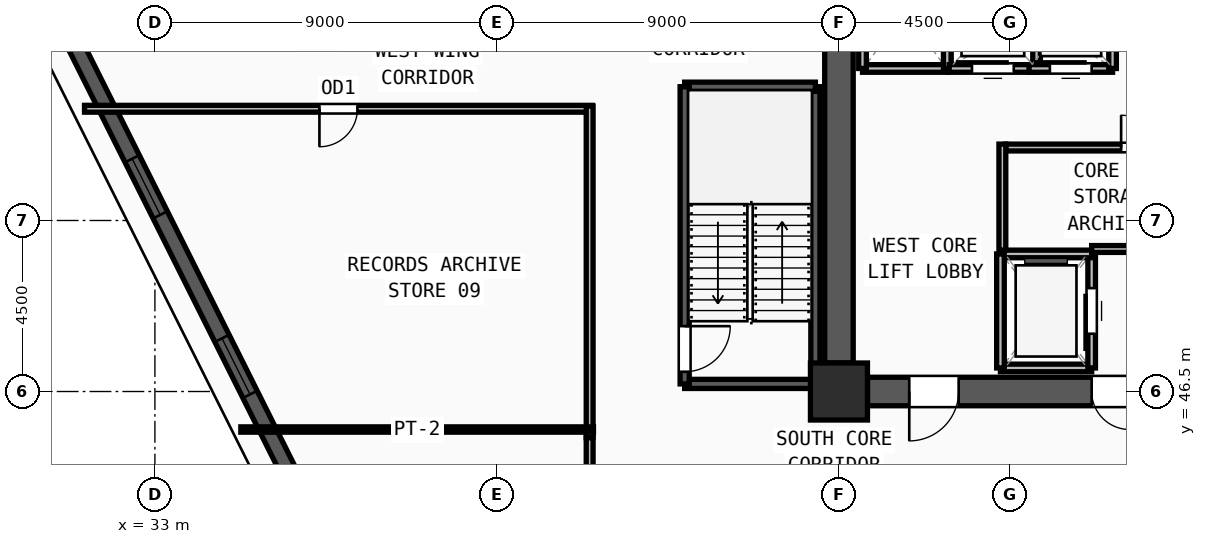
"""IFC4 building model, lengths in metres.
Left out: names, types, materials, properties, quantities, classifications, styles, units other than length and angle.
Written with IfcOpenShell. Run it as: python <this file> out.ifc"""

import sys

from ifc_helpers import new_model, si_unit, direction, frame, frame_2d, origin, origin_2d, place, context, subcontext, project, spatial, rectangle, extrude, source, transform, mapped, element, fill, save


model = new_model("IFC4")
c1 = context("Model", 3, precision=1e-05, world=origin(), true_north=direction((0.0, 1.0)))
c2 = subcontext(c1, "Body", "Model", "MODEL_VIEW")
j1 = project(units=[si_unit("LENGTHUNIT", "METRE"), si_unit("PLANEANGLEUNIT", "RADIAN")], contexts=[c1])
p1 = place(None, origin())
s1 = spatial("IfcSite", under=j1, at=p1, CompositionType="ELEMENT")
p2 = place(p1, origin())
s2 = spatial("IfcBuilding", under=s1, at=p2, CompositionType="ELEMENT")
p3 = place(p2, frame((0.0, 0.0, 155.25)))
s3 = spatial("IfcBuildingStorey", under=s2, at=p3, CompositionType="ELEMENT", Elevation=155.25)
m1 = source(origin(), c2, "Body", "SweptSolid", [
    extrude(rectangle(XDim=1.5, YDim=1.5, at=origin_2d()), origin(), (0.0, 0.0, 1.0), 3.75),
])
p4 = place(p3, frame((51.0, 46.5, 0.0), z_axis=(0.0, 0.0, 1.0), x_axis=(1.0, 0.0, 0.0)))
e1 = element("IfcColumn", 1, at=p4, inside=s3, PredefinedType="COLUMN", context=c2, shape_type="MappedRepresentation", body=[
    mapped(m1, transform((0.0, 0.0, 0.0), x_axis=(1.0, 0.0, 0.0), y_axis=(0.0, 1.0, 0.0), z_axis=(0.0, 0.0, 1.0), scale=1.0)),
])
p5 = place(p3, frame((25.204, 67.014, 0.0), z_axis=(0.0, 0.0, 1.0), x_axis=(0.447340705753, -0.894363624583, 0.0)))
e2 = element("IfcWall", 2, at=p5, inside=s3, PredefinedType="SOLIDWALL", context=c2, shape_type="SweptSolid", body=[
    extrude(rectangle(XDim=30.73, YDim=0.42, at=frame_2d((15.365, 0.0))), origin(), (0.0, 0.0, 1.0), 3.57),
])
m2 = source(origin(), c2, "Body", "SweptSolid", [
    extrude(rectangle(XDim=1.65, YDim=1.95, at=frame_2d((0.825, 0.975))), frame((0.0, 0.22, 0.0), z_axis=(0.0, -1.0, 0.0), x_axis=(1.0, 0.0, 0.0)), (0.0, 0.0, 1.0), 0.44),
])
p6 = place(p5, frame((7.708, 0.0, 0.55)))
e3 = element("IfcOpeningElement", 3, at=p6, cuts=e2, PredefinedType="OPENING", context=c2, shape_type="MappedRepresentation", body=[
    mapped(m2, transform((0.0, 0.0, 0.0), x_axis=(1.0, 0.0, 0.0), y_axis=(0.0, 1.0, 0.0), z_axis=(0.0, 0.0, 1.0), scale=1.0)),
])
p7 = place(p5, frame((16.09, 0.0, 0.55)))
e4 = element("IfcOpeningElement", 4, at=p7, cuts=e2, PredefinedType="OPENING", context=c2, shape_type="MappedRepresentation", body=[
    mapped(m2, transform((0.0, 0.0, 0.0), x_axis=(1.0, 0.0, 0.0), y_axis=(0.0, 1.0, 0.0), z_axis=(0.0, 0.0, 1.0), scale=1.0)),
])
p8 = place(p5, frame((21.373, 0.0, 0.55)))
e5 = element("IfcOpeningElement", 5, at=p8, cuts=e2, PredefinedType="OPENING", context=c2, shape_type="MappedRepresentation", body=[
    mapped(m2, transform((0.0, 0.0, 0.0), x_axis=(1.0, 0.0, 0.0), y_axis=(0.0, 1.0, 0.0), z_axis=(0.0, 0.0, 1.0), scale=1.0)),
])
p9 = place(p3, frame((59.25, 46.5, 0.0), z_axis=(0.0, 0.0, 1.0), x_axis=(-1.0, 0.0, 0.0)))
e6 = element("IfcWall", 6, at=p9, inside=s3, PredefinedType="SHEAR", context=c2, shape_type="SweptSolid", body=[
    extrude(rectangle(XDim=7.5, YDim=0.75, at=frame_2d((3.75, 0.0))), origin(), (0.0, 0.0, 1.0), 3.57),
])
m3 = source(origin(), c2, "Body", "SweptSolid", [
    extrude(rectangle(XDim=1.3, YDim=2.2, at=frame_2d((0.65, 1.1))), frame((0.0, 0.385, 0.0), z_axis=(0.0, -1.0, 0.0), x_axis=(1.0, 0.0, 0.0)), (0.0, 0.0, 1.0), 0.77),
])
p10 = place(p9, frame((5.1, 0.0, 0.0)))
e7 = element("IfcOpeningElement", 7, at=p10, cuts=e6, PredefinedType="OPENING", context=c2, shape_type="MappedRepresentation", body=[
    mapped(m3, transform((0.0, 0.0, 0.0), x_axis=(1.0, 0.0, 0.0), y_axis=(0.0, 1.0, 0.0), z_axis=(0.0, 0.0, 1.0), scale=1.0)),
])
m4 = source(origin(), c2, "Body", "SweptSolid", [
    extrude(rectangle(XDim=1.0, YDim=2.2, at=frame_2d((0.5, 1.1))), frame((0.0, 0.385, 0.0), z_axis=(0.0, -1.0, 0.0), x_axis=(1.0, 0.0, 0.0)), (0.0, 0.0, 1.0), 0.77),
])
p11 = place(p9, frame((0.6, 0.0, 0.0)))
e8 = element("IfcOpeningElement", 8, at=p11, cuts=e6, PredefinedType="OPENING", context=c2, shape_type="MappedRepresentation", body=[
    mapped(m4, transform((0.0, 0.0, 0.0), x_axis=(1.0, 0.0, 0.0), y_axis=(0.0, 1.0, 0.0), z_axis=(0.0, 0.0, 1.0), scale=1.0)),
])
p12 = place(p3, frame((51.0, 47.25, 0.0), z_axis=(0.0, 0.0, 1.0), x_axis=(0.0, 1.0, 0.0)))
e9 = element("IfcWall", 9, at=p12, inside=s3, PredefinedType="SHEAR", context=c2, shape_type="SweptSolid", body=[
    extrude(rectangle(XDim=13.5, YDim=0.75, at=frame_2d((6.75, 0.0))), origin(), (0.0, 0.0, 1.0), 3.57),
])
p13 = place(p3, frame((46.94, 46.7, 0.0), z_axis=(0.0, 0.0, 1.0), x_axis=(1.0, 0.0, 0.0)))
e10 = element("IfcWall", 10, at=p13, inside=s3, PredefinedType="SOLIDWALL", context=c2, shape_type="SweptSolid", body=[
    extrude(rectangle(XDim=3.44, YDim=0.24, at=frame_2d((1.72, 0.0))), origin(), (0.0, 0.0, 1.0), 3.57),
])
p14 = place(p3, frame((50.38, 46.7, 0.0), z_axis=(0.0, 0.0, 1.0), x_axis=(0.0, 1.0, 0.0)))
e11 = element("IfcWall", 11, at=p14, inside=s3, PredefinedType="SOLIDWALL", context=c2, shape_type="SweptSolid", body=[
    extrude(rectangle(XDim=7.82, YDim=0.24, at=frame_2d((3.91, 0.0))), origin(), (0.0, 0.0, 1.0), 3.57),
])
p15 = place(p3, frame((50.38, 54.52, 0.0), z_axis=(0.0, 0.0, 1.0), x_axis=(-1.0, 0.0, 0.0)))
e12 = element("IfcWall", 12, at=p15, inside=s3, PredefinedType="SOLIDWALL", context=c2, shape_type="SweptSolid", body=[
    extrude(rectangle(XDim=3.44, YDim=0.24, at=frame_2d((1.72, 0.0))), origin(), (0.0, 0.0, 1.0), 3.57),
])
p16 = place(p3, frame((46.94, 54.52, 0.0), z_axis=(0.0, 0.0, 1.0), x_axis=(0.0, -1.0, 0.0)))
e13 = element("IfcWall", 13, at=p16, inside=s3, PredefinedType="SOLIDWALL", context=c2, shape_type="SweptSolid", body=[
    extrude(rectangle(XDim=7.82, YDim=0.24, at=frame_2d((3.91, 0.0))), origin(), (0.0, 0.0, 1.0), 3.57),
])
m5 = source(origin(), c2, "Body", "SweptSolid", [
    extrude(rectangle(XDim=1.2, YDim=2.2, at=frame_2d((0.6, 1.1))), frame((0.0, 0.13, 0.0), z_axis=(0.0, -1.0, 0.0), x_axis=(1.0, 0.0, 0.0)), (0.0, 0.0, 1.0), 0.26),
])
p17 = place(p16, frame((6.3, 0.0, 0.0)))
e14 = element("IfcOpeningElement", 14, at=p17, cuts=e13, PredefinedType="OPENING", context=c2, shape_type="MappedRepresentation", body=[
    mapped(m5, transform((0.0, 0.0, 0.0), x_axis=(1.0, 0.0, 0.0), y_axis=(0.0, 1.0, 0.0), z_axis=(0.0, 0.0, 1.0), scale=1.0)),
])
p18 = place(p3, frame((55.25, 47.12, 0.0), z_axis=(0.0, 0.0, 1.0), x_axis=(1.0, 0.0, 0.0)))
e15 = element("IfcWall", 15, at=p18, inside=s3, PredefinedType="SOLIDWALL", context=c2, shape_type="SweptSolid", body=[
    extrude(rectangle(XDim=2.4, YDim=0.2, at=frame_2d((1.2, 0.0))), origin(), (0.0, 0.0, 1.0), 3.57),
])
p19 = place(p3, frame((57.65, 47.12, 0.0), z_axis=(0.0, 0.0, 1.0), x_axis=(0.0, 1.0, 0.0)))
e16 = element("IfcWall", 16, at=p19, inside=s3, PredefinedType="SOLIDWALL", context=c2, shape_type="SweptSolid", body=[
    extrude(rectangle(XDim=3.0, YDim=0.2, at=frame_2d((1.5, 0.0))), origin(), (0.0, 0.0, 1.0), 3.57),
])
m6 = source(origin(), c2, "Body", "SweptSolid", [
    extrude(rectangle(XDim=1.2, YDim=2.3, at=frame_2d((0.6, 1.15))), frame((0.0, 0.11, 0.0), z_axis=(0.0, -1.0, 0.0), x_axis=(1.0, 0.0, 0.0)), (0.0, 0.0, 1.0), 0.22),
])
p20 = place(p19, frame((0.9, 0.0, 0.0)))
e17 = element("IfcOpeningElement", 17, at=p20, cuts=e16, PredefinedType="OPENING", context=c2, shape_type="MappedRepresentation", body=[
    mapped(m6, transform((0.0, 0.0, 0.0), x_axis=(1.0, 0.0, 0.0), y_axis=(0.0, 1.0, 0.0), z_axis=(0.0, 0.0, 1.0), scale=1.0)),
])
p21 = place(p3, frame((57.65, 50.12, 0.0), z_axis=(0.0, 0.0, 1.0), x_axis=(-1.0, 0.0, 0.0)))
e18 = element("IfcWall", 18, at=p21, inside=s3, PredefinedType="SOLIDWALL", context=c2, shape_type="SweptSolid", body=[
    extrude(rectangle(XDim=2.4, YDim=0.2, at=frame_2d((1.2, 0.0))), origin(), (0.0, 0.0, 1.0), 3.57),
])
p22 = place(p3, frame((55.25, 50.12, 0.0), z_axis=(0.0, 0.0, 1.0), x_axis=(0.0, -1.0, 0.0)))
e19 = element("IfcWall", 19, at=p22, inside=s3, PredefinedType="SOLIDWALL", context=c2, shape_type="SweptSolid", body=[
    extrude(rectangle(XDim=3.0, YDim=0.2, at=frame_2d((1.5, 0.0))), origin(), (0.0, 0.0, 1.0), 3.57),
])
p23 = place(p3, frame((51.62, 55.0, 0.0), z_axis=(0.0, 0.0, 1.0), x_axis=(1.0, 0.0, 0.0)))
e20 = element("IfcWall", 20, at=p23, inside=s3, PredefinedType="SOLIDWALL", context=c2, shape_type="SweptSolid", body=[
    extrude(rectangle(XDim=2.23, YDim=0.2, at=frame_2d((1.115, 0.0))), origin(), (0.0, 0.0, 1.0), 3.57),
])
for number, where, z_axis, x_axis in (
    (21, (53.85, 55.0, 0.0), (0.0, 0.0, 1.0), (0.0, 1.0, 0.0)),
    (22, (51.62, 58.0, 0.0), (0.0, 0.0, 1.0), (0.0, -1.0, 0.0)),
):
    element("IfcWall", number, at=place(p3, frame(where, z_axis=z_axis, x_axis=x_axis)), inside=s3, PredefinedType="SOLIDWALL", context=c2, shape_type="SweptSolid", body=[
        extrude(rectangle(XDim=3.0, YDim=0.2, at=frame_2d((1.5, 0.0))), origin(), (0.0, 0.0, 1.0), 3.57),
    ])
p24 = place(p3, frame((53.9, 55.0, 0.0), z_axis=(0.0, 0.0, 1.0), x_axis=(1.0, 0.0, 0.0)))
e23 = element("IfcWall", 23, at=p24, inside=s3, PredefinedType="SOLIDWALL", context=c2, shape_type="SweptSolid", body=[
    extrude(rectangle(XDim=2.3, YDim=0.2, at=frame_2d((1.15, 0.0))), origin(), (0.0, 0.0, 1.0), 3.57),
])
m7 = source(origin(), c2, "Body", "SweptSolid", [
    extrude(rectangle(XDim=1.1, YDim=2.2, at=frame_2d((0.55, 1.1))), frame((0.0, 0.11, 0.0), z_axis=(0.0, -1.0, 0.0), x_axis=(1.0, 0.0, 0.0)), (0.0, 0.0, 1.0), 0.22),
])
p25 = place(p24, frame((0.6, 0.0, 0.0)))
e24 = element("IfcOpeningElement", 24, at=p25, cuts=e23, PredefinedType="OPENING", context=c2, shape_type="MappedRepresentation", body=[
    mapped(m7, transform((0.0, 0.0, 0.0), x_axis=(1.0, 0.0, 0.0), y_axis=(0.0, 1.0, 0.0), z_axis=(0.0, 0.0, 1.0), scale=1.0)),
])
p26 = place(p3, frame((56.2, 55.0, 0.0), z_axis=(0.0, 0.0, 1.0), x_axis=(0.0, 1.0, 0.0)))
e25 = element("IfcWall", 25, at=p26, inside=s3, PredefinedType="SOLIDWALL", context=c2, shape_type="SweptSolid", body=[
    extrude(rectangle(XDim=2.6, YDim=0.2, at=frame_2d((1.3, 0.0))), origin(), (0.0, 0.0, 1.0), 3.57),
])
p27 = place(p3, frame((56.0, 55.0, 0.0), z_axis=(0.0, 0.0, 1.0), x_axis=(1.0, 0.0, 0.0)))
e26 = element("IfcWall", 26, at=p27, inside=s3, PredefinedType="SOLIDWALL", context=c2, shape_type="SweptSolid", body=[
    extrude(rectangle(XDim=2.2, YDim=0.2, at=frame_2d((1.1, 0.0))), origin(), (0.0, 0.0, 1.0), 3.57),
])
p28 = place(p27, frame((0.55, 0.0, 0.0)))
e27 = element("IfcOpeningElement", 27, at=p28, cuts=e26, PredefinedType="OPENING", context=c2, shape_type="MappedRepresentation", body=[
    mapped(m7, transform((0.0, 0.0, 0.0), x_axis=(1.0, 0.0, 0.0), y_axis=(0.0, 1.0, 0.0), z_axis=(0.0, 0.0, 1.0), scale=1.0)),
])
p29 = place(p3, frame((58.2, 55.0, 0.0), z_axis=(0.0, 0.0, 1.0), x_axis=(0.0, 1.0, 0.0)))
e28 = element("IfcWall", 28, at=p29, inside=s3, PredefinedType="SOLIDWALL", context=c2, shape_type="SweptSolid", body=[
    extrude(rectangle(XDim=2.6, YDim=0.2, at=frame_2d((1.3, 0.0))), origin(), (0.0, 0.0, 1.0), 3.57),
])
p30 = place(p3, frame((55.39, 52.92, 0.0), z_axis=(0.0, 0.0, 1.0), x_axis=(1.0, 0.0, 0.0)))
e29 = element("IfcWall", 29, at=p30, inside=s3, PredefinedType="PARTITIONING", context=c2, shape_type="SweptSolid", body=[
    extrude(rectangle(XDim=6.91, YDim=0.18, at=frame_2d((3.455, 0.0))), origin(), (0.0, 0.0, 1.0), 3.57),
])
m8 = source(origin(), c2, "Body", "SweptSolid", [
    extrude(rectangle(XDim=0.85, YDim=2.1, at=frame_2d((0.425, 1.05))), frame((0.0, 0.1, 0.0), z_axis=(0.0, -1.0, 0.0), x_axis=(1.0, 0.0, 0.0)), (0.0, 0.0, 1.0), 0.2),
])
p31 = place(p30, frame((3.035, 0.0, 0.0)))
e30 = element("IfcOpeningElement", 30, at=p31, cuts=e29, PredefinedType="OPENING", context=c2, shape_type="MappedRepresentation", body=[
    mapped(m8, transform((0.0, 0.0, 0.0), x_axis=(1.0, 0.0, 0.0), y_axis=(0.0, 1.0, 0.0), z_axis=(0.0, 0.0, 1.0), scale=1.0)),
])
p32 = place(p3, frame((44.51, 53.94, 0.0), z_axis=(0.0, 0.0, 1.0), x_axis=(-1.0, 0.0, 0.0)))
e31 = element("IfcWall", 31, at=p32, inside=s3, PredefinedType="PARTITIONING", context=c2, shape_type="SweptSolid", body=[
    extrude(rectangle(XDim=13.362, YDim=0.18, at=frame_2d((6.681, 0.0))), origin(), (0.0, 0.0, 1.0), 3.57),
])
m9 = source(origin(), c2, "Body", "SweptSolid", [
    extrude(rectangle(XDim=1.0, YDim=2.2, at=frame_2d((0.5, 1.1))), frame((0.0, 0.1, 0.0), z_axis=(0.0, -1.0, 0.0), x_axis=(1.0, 0.0, 0.0)), (0.0, 0.0, 1.0), 0.2),
])
p33 = place(p32, frame((6.181, 0.0, 0.0)))
e32 = element("IfcOpeningElement", 32, at=p33, cuts=e31, PredefinedType="OPENING", context=c2, shape_type="MappedRepresentation", body=[
    mapped(m9, transform((0.0, 0.0, 0.0), x_axis=(1.0, 0.0, 0.0), y_axis=(0.0, 1.0, 0.0), z_axis=(0.0, 0.0, 1.0), scale=1.0)),
])
p34 = place(p3, frame((44.44, 45.285, 0.0), z_axis=(0.0, 0.0, 1.0), x_axis=(0.0, 1.0, 0.0)))
e33 = element("IfcWall", 33, at=p34, inside=s3, PredefinedType="PARTITIONING", context=c2, shape_type="SweptSolid", body=[
    extrude(rectangle(XDim=8.725, YDim=0.18, at=frame_2d((4.363, 0.0))), origin(), (0.0, 0.0, 1.0), 3.57),
])
p35 = place(p3, frame((44.44, 43.67, 0.0), z_axis=(0.0, 0.0, 1.0), x_axis=(0.0, 1.0, 0.0)))
e34 = element("IfcWall", 34, at=p35, inside=s3, PredefinedType="PARTITIONING", context=c2, shape_type="SweptSolid", body=[
    extrude(rectangle(XDim=1.615, YDim=0.18, at=frame_2d((0.808, 0.0))), origin(), (0.0, 0.0, 1.0), 3.57),
])
p36 = place(p3, frame((44.54, 45.5, 0.0), z_axis=(0.0, 0.0, 1.0), x_axis=(-1.0, 0.0, 0.0)))
e35 = element("IfcWall", 35, at=p36, inside=s3, PredefinedType="PARTITIONING", context=c2, shape_type="SweptSolid", body=[
    extrude(rectangle(XDim=9.279, YDim=0.14, at=frame_2d((4.64, 0.0))), origin(), (0.0, 0.0, 1.0), 3.57),
])
p37 = place(p3, frame((55.3, 50.22, 0.0), z_axis=(0.0, 0.0, 1.0), x_axis=(0.0, 1.0, 0.0)))
e36 = element("IfcWall", 36, at=p37, inside=s3, PredefinedType="PARTITIONING", context=c2, shape_type="SweptSolid", body=[
    extrude(rectangle(XDim=2.79, YDim=0.18, at=frame_2d((1.395, 0.0))), origin(), (0.0, 0.0, 1.0), 3.57),
])
p38 = place(p3, frame((57.65, 50.25, 0.0), z_axis=(0.0, 0.0, 1.0), x_axis=(1.0, 0.0, 0.0)))
e37 = element("IfcWall", 37, at=p38, inside=s3, PredefinedType="PARTITIONING", context=c2, shape_type="SweptSolid", body=[
    extrude(rectangle(XDim=4.65, YDim=0.18, at=frame_2d((2.325, 0.0))), origin(), (0.0, 0.0, 1.0), 3.57),
])
m10 = source(origin(), c2, "Body", "SweptSolid", [
    extrude(rectangle(XDim=1.65, YDim=1.95, at=frame_2d((0.825, 0.975))), frame((0.0, 0.03, 0.0), z_axis=(0.0, -1.0, 0.0), x_axis=(1.0, 0.0, 0.0)), (0.0, 0.0, 1.0), 0.06),
])
p39 = place(p7, origin())
e38 = element("IfcWindow", 38, at=p39, inside=s3, PartitioningType="DOUBLE_PANEL_VERTICAL", PredefinedType="WINDOW", context=c2, shape_type="MappedRepresentation", body=[
    mapped(m10, transform((0.0, 0.0, 0.0), x_axis=(1.0, 0.0, 0.0), y_axis=(0.0, 1.0, 0.0), z_axis=(0.0, 0.0, 1.0), scale=1.0)),
])
fill(e4, e38)
p40 = place(p8, origin())
e39 = element("IfcWindow", 39, at=p40, inside=s3, PartitioningType="DOUBLE_PANEL_VERTICAL", PredefinedType="WINDOW", context=c2, shape_type="MappedRepresentation", body=[
    mapped(m10, transform((0.0, 0.0, 0.0), x_axis=(1.0, 0.0, 0.0), y_axis=(0.0, 1.0, 0.0), z_axis=(0.0, 0.0, 1.0), scale=1.0)),
])
fill(e5, e39)
m11 = source(origin(), c2, "Body", "SweptSolid", [
    extrude(rectangle(XDim=1.3, YDim=2.2, at=frame_2d((0.65, 1.1))), frame((0.0, 0.025, 0.0), z_axis=(0.0, -1.0, 0.0), x_axis=(1.0, 0.0, 0.0)), (0.0, 0.0, 1.0), 0.05),
])
p41 = place(p10, origin())
e40 = element("IfcDoor", 40, at=p41, inside=s3, OperationType="SINGLE_SWING_RIGHT", PredefinedType="DOOR", context=c2, shape_type="MappedRepresentation", body=[
    mapped(m11, transform((0.0, 0.0, 0.0), x_axis=(1.0, 0.0, 0.0), y_axis=(0.0, 1.0, 0.0), z_axis=(0.0, 0.0, 1.0), scale=1.0)),
])
fill(e7, e40)
m12 = source(origin(), c2, "Body", "SweptSolid", [
    extrude(rectangle(XDim=1.0, YDim=2.2, at=frame_2d((0.5, 1.1))), frame((0.0, 0.025, 0.0), z_axis=(0.0, -1.0, 0.0), x_axis=(1.0, 0.0, 0.0)), (0.0, 0.0, 1.0), 0.05),
])
p42 = place(p11, origin())
e41 = element("IfcDoor", 41, at=p42, inside=s3, OperationType="SINGLE_SWING_LEFT", PredefinedType="DOOR", context=c2, shape_type="MappedRepresentation", body=[
    mapped(m12, transform((0.0, 0.0, 0.0), x_axis=(1.0, 0.0, 0.0), y_axis=(0.0, 1.0, 0.0), z_axis=(0.0, 0.0, 1.0), scale=1.0)),
])
fill(e8, e41)
m13 = source(origin(), c2, "Body", "SweptSolid", [
    extrude(rectangle(XDim=1.2, YDim=2.2, at=frame_2d((0.6, 1.1))), frame((0.0, 0.025, 0.0), z_axis=(0.0, -1.0, 0.0), x_axis=(1.0, 0.0, 0.0)), (0.0, 0.0, 1.0), 0.05),
])
p43 = place(p17, origin())
e42 = element("IfcDoor", 42, at=p43, inside=s3, OperationType="SINGLE_SWING_LEFT", PredefinedType="DOOR", context=c2, shape_type="MappedRepresentation", body=[
    mapped(m13, transform((0.0, 0.0, 0.0), x_axis=(1.0, 0.0, 0.0), y_axis=(0.0, 1.0, 0.0), z_axis=(0.0, 0.0, 1.0), scale=1.0)),
])
fill(e14, e42)
m14 = source(origin(), c2, "Body", "SweptSolid", [
    extrude(rectangle(XDim=1.2, YDim=2.3, at=frame_2d((0.6, 1.15))), frame((0.0, 0.025, 0.0), z_axis=(0.0, -1.0, 0.0), x_axis=(1.0, 0.0, 0.0)), (0.0, 0.0, 1.0), 0.05),
])
p44 = place(p20, origin())
e43 = element("IfcDoor", 43, at=p44, inside=s3, OperationType="SLIDING_TO_LEFT", PredefinedType="DOOR", context=c2, shape_type="MappedRepresentation", body=[
    mapped(m14, transform((0.0, 0.0, 0.0), x_axis=(1.0, 0.0, 0.0), y_axis=(0.0, 1.0, 0.0), z_axis=(0.0, 0.0, 1.0), scale=1.0)),
])
fill(e17, e43)
m15 = source(origin(), c2, "Body", "SweptSolid", [
    extrude(rectangle(XDim=1.1, YDim=2.2, at=frame_2d((0.55, 1.1))), frame((0.0, 0.025, 0.0), z_axis=(0.0, -1.0, 0.0), x_axis=(1.0, 0.0, 0.0)), (0.0, 0.0, 1.0), 0.05),
])
p45 = place(p25, origin())
e44 = element("IfcDoor", 44, at=p45, inside=s3, OperationType="SLIDING_TO_LEFT", PredefinedType="DOOR", context=c2, shape_type="MappedRepresentation", body=[
    mapped(m15, transform((0.0, 0.0, 0.0), x_axis=(1.0, 0.0, 0.0), y_axis=(0.0, 1.0, 0.0), z_axis=(0.0, 0.0, 1.0), scale=1.0)),
])
fill(e24, e44)
p46 = place(p28, origin())
e45 = element("IfcDoor", 45, at=p46, inside=s3, OperationType="SLIDING_TO_LEFT", PredefinedType="DOOR", context=c2, shape_type="MappedRepresentation", body=[
    mapped(m15, transform((0.0, 0.0, 0.0), x_axis=(1.0, 0.0, 0.0), y_axis=(0.0, 1.0, 0.0), z_axis=(0.0, 0.0, 1.0), scale=1.0)),
])
fill(e27, e45)
m16 = source(origin(), c2, "Body", "SweptSolid", [
    extrude(rectangle(XDim=0.85, YDim=2.1, at=frame_2d((0.425, 1.05))), frame((0.0, 0.025, 0.0), z_axis=(0.0, -1.0, 0.0), x_axis=(1.0, 0.0, 0.0)), (0.0, 0.0, 1.0), 0.05),
])
p47 = place(p31, origin())
e46 = element("IfcDoor", 46, at=p47, inside=s3, OperationType="SINGLE_SWING_LEFT", PredefinedType="DOOR", context=c2, shape_type="MappedRepresentation", body=[
    mapped(m16, transform((0.0, 0.0, 0.0), x_axis=(1.0, 0.0, 0.0), y_axis=(0.0, 1.0, 0.0), z_axis=(0.0, 0.0, 1.0), scale=1.0)),
])
fill(e30, e46)
p48 = place(p33, origin())
e47 = element("IfcDoor", 47, at=p48, inside=s3, OperationType="SINGLE_SWING_RIGHT", PredefinedType="DOOR", context=c2, shape_type="MappedRepresentation", body=[
    mapped(m12, transform((0.0, 0.0, 0.0), x_axis=(1.0, 0.0, 0.0), y_axis=(0.0, 1.0, 0.0), z_axis=(0.0, 0.0, 1.0), scale=1.0)),
])
fill(e32, e47)
save(model, sys.argv[1])
